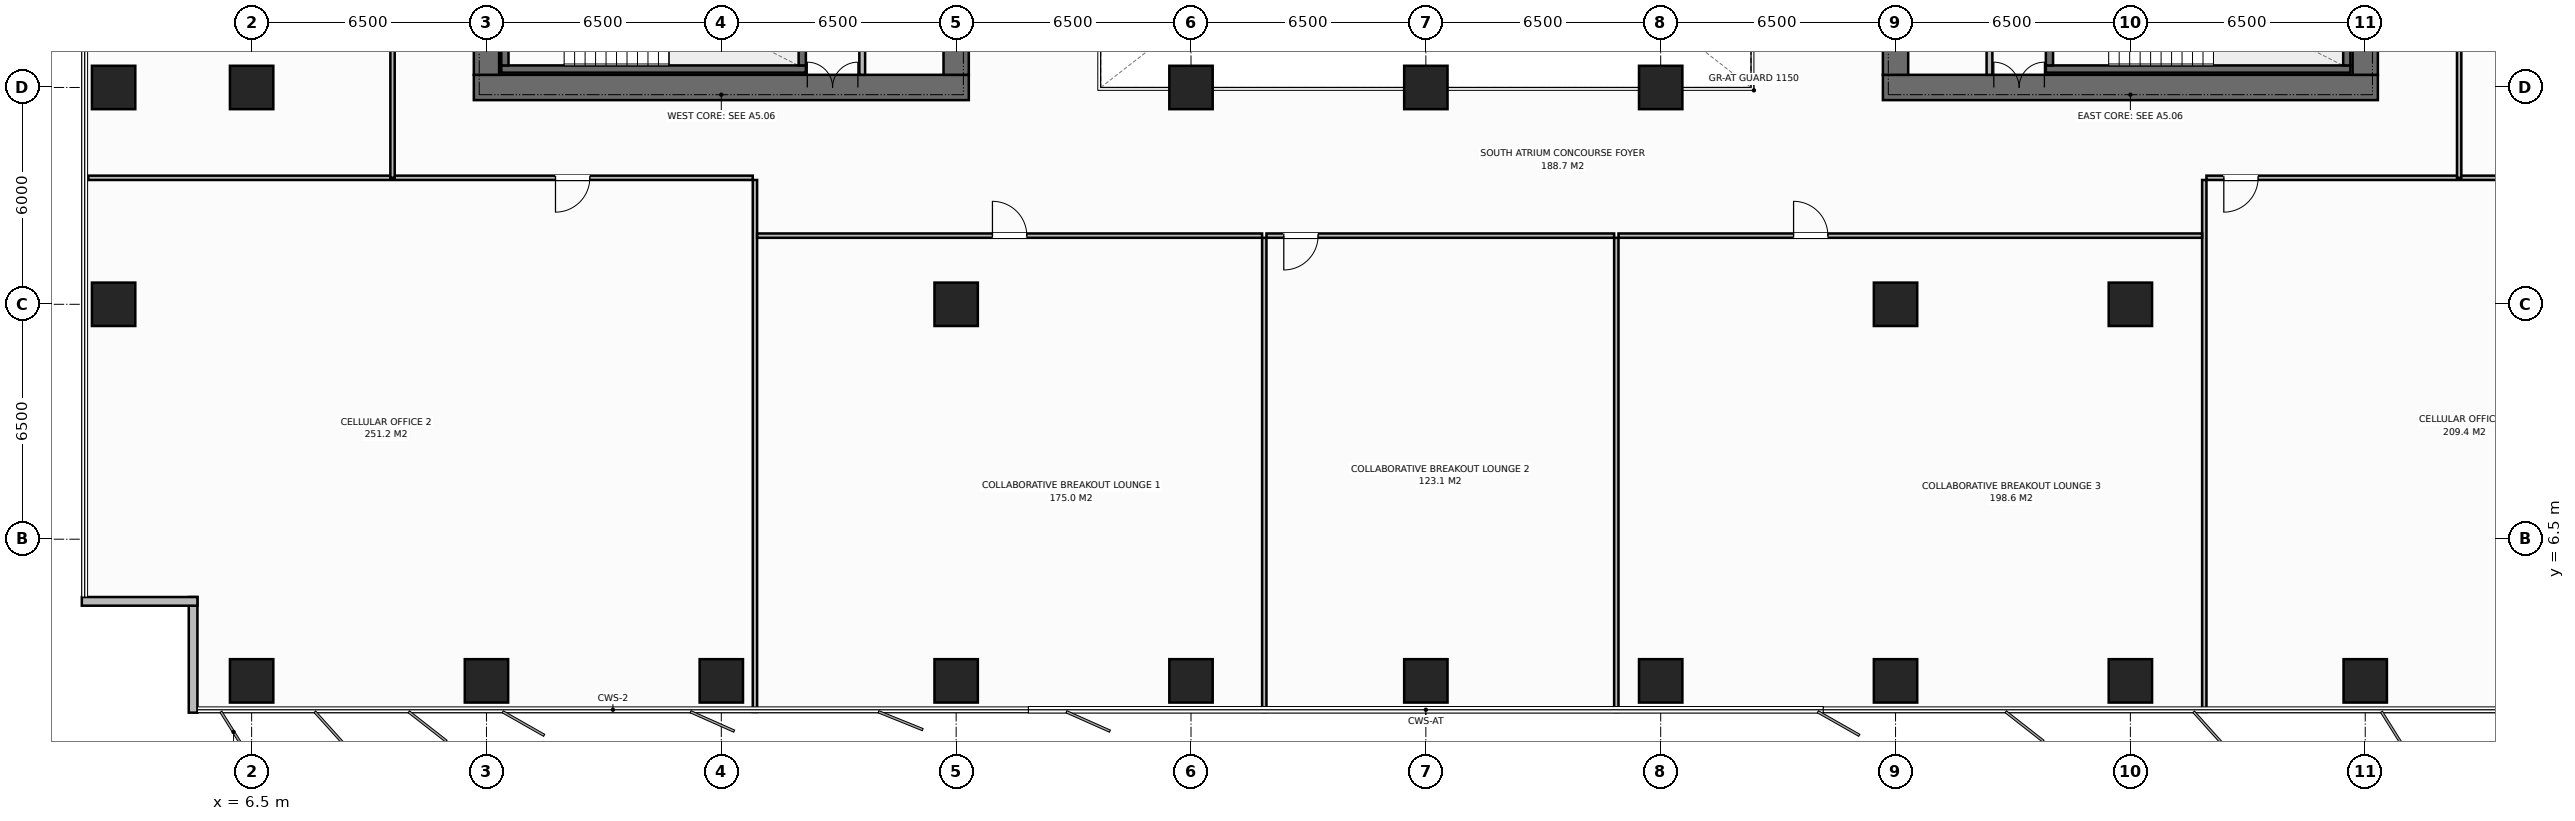
"""IFC4 building model, lengths in metres.
Left out: names, types, materials, properties, quantities, classifications, styles, units other than length and angle.
Written with IfcOpenShell. Run it as: python <this file> out.ifc"""

import sys

from ifc_helpers import new_model, si_unit, direction, frame, frame_2d, origin, origin_2d, place, context, subcontext, project, spatial, rectangle, extrude, element, fill, save


model = new_model("IFC4")
c1 = context("Model", 3, precision=1e-05, world=origin(), true_north=direction((0.0, 1.0)))
c2 = subcontext(c1, "Body", "Model", "MODEL_VIEW")
j1 = project(units=[si_unit("LENGTHUNIT", "METRE"), si_unit("PLANEANGLEUNIT", "RADIAN")], contexts=[c1])
p1 = place(None, origin())
s1 = spatial("IfcSite", under=j1, at=p1, CompositionType="ELEMENT")
p2 = place(p1, origin())
s2 = spatial("IfcBuilding", under=s1, at=p2, CompositionType="ELEMENT")
p3 = place(p2, frame((0.0, 0.0, 112.6)))
s3 = spatial("IfcBuildingStorey", under=s2, at=p3, CompositionType="ELEMENT", Elevation=112.6)
p4 = place(p3, frame((12.65, 19.0, 0.0), z_axis=(0.0, 0.0, 1.0), x_axis=(1.0, 0.0, 0.0)))
e1 = element("IfcWall", 1, at=p4, inside=s3, PredefinedType="SHEAR", context=c2, shape_type="SweptSolid", body=[
    extrude(rectangle(XDim=13.7, YDim=0.7, at=frame_2d((6.85, 0.0))), origin(), (0.0, 0.0, 1.0), 3.8),
])
p5 = place(p4, frame((9.23, 0.0, 0.0)))
e2 = element("IfcOpeningElement", 2, at=p5, cuts=e1, PredefinedType="OPENING", context=c2, shape_type="SweptSolid", body=[
    extrude(rectangle(XDim=1.4, YDim=2.2, at=frame_2d((0.7, 1.1))), frame((0.0, 0.36, 0.0), z_axis=(0.0, -1.0, 0.0), x_axis=(1.0, 0.0, 0.0)), (0.0, 0.0, 1.0), 0.72),
])
p6 = place(p3, frame((13.0, 19.35, 0.0), z_axis=(0.0, 0.0, 1.0), x_axis=(0.0, 1.0, 0.0)))
e3 = element("IfcWall", 3, at=p6, inside=s3, PredefinedType="SHEAR", context=c2, shape_type="SweptSolid", body=[
    extrude(rectangle(XDim=13.3, YDim=0.7, at=frame_2d((6.65, 0.0))), origin(), (0.0, 0.0, 1.0), 3.8),
])
p7 = place(p6, frame((4.7, 0.0, 0.0)))
e4 = element("IfcOpeningElement", 4, at=p7, cuts=e3, PredefinedType="OPENING", context=c2, shape_type="SweptSolid", body=[
    extrude(rectangle(XDim=1.4, YDim=2.2, at=frame_2d((0.7, 1.1))), frame((0.0, 0.36, 0.0), z_axis=(0.0, -1.0, 0.0), x_axis=(1.0, 0.0, 0.0)), (0.0, 0.0, 1.0), 0.72),
])
p8 = place(p3, frame((26.0, 19.35, 0.0), z_axis=(0.0, 0.0, 1.0), x_axis=(0.0, 1.0, 0.0)))
e5 = element("IfcWall", 5, at=p8, inside=s3, PredefinedType="SHEAR", context=c2, shape_type="SweptSolid", body=[
    extrude(rectangle(XDim=13.3, YDim=0.7, at=frame_2d((6.65, 0.0))), origin(), (0.0, 0.0, 1.0), 3.8),
])
p9 = place(p3, frame((51.65, 19.0, 0.0), z_axis=(0.0, 0.0, 1.0), x_axis=(1.0, 0.0, 0.0)))
e6 = element("IfcWall", 6, at=p9, inside=s3, PredefinedType="SHEAR", context=c2, shape_type="SweptSolid", body=[
    extrude(rectangle(XDim=13.7, YDim=0.7, at=frame_2d((6.85, 0.0))), origin(), (0.0, 0.0, 1.0), 3.8),
])
p10 = place(p9, frame((3.07, 0.0, 0.0)))
e7 = element("IfcOpeningElement", 7, at=p10, cuts=e6, PredefinedType="OPENING", context=c2, shape_type="SweptSolid", body=[
    extrude(rectangle(XDim=1.4, YDim=2.2, at=frame_2d((0.7, 1.1))), frame((0.0, 0.36, 0.0), z_axis=(0.0, -1.0, 0.0), x_axis=(1.0, 0.0, 0.0)), (0.0, 0.0, 1.0), 0.72),
])
p11 = place(p3, frame((52.0, 19.35, 0.0), z_axis=(0.0, 0.0, 1.0), x_axis=(0.0, 1.0, 0.0)))
e8 = element("IfcWall", 8, at=p11, inside=s3, PredefinedType="SHEAR", context=c2, shape_type="SweptSolid", body=[
    extrude(rectangle(XDim=13.3, YDim=0.7, at=frame_2d((6.65, 0.0))), origin(), (0.0, 0.0, 1.0), 3.8),
])
p12 = place(p3, frame((65.0, 19.35, 0.0), z_axis=(0.0, 0.0, 1.0), x_axis=(0.0, 1.0, 0.0)))
e9 = element("IfcWall", 9, at=p12, inside=s3, PredefinedType="SHEAR", context=c2, shape_type="SweptSolid", body=[
    extrude(rectangle(XDim=13.3, YDim=0.7, at=frame_2d((6.65, 0.0))), origin(), (0.0, 0.0, 1.0), 3.8),
])
p13 = place(p12, frame((8.1, 0.0, 0.0)))
e10 = element("IfcOpeningElement", 10, at=p13, cuts=e9, PredefinedType="OPENING", context=c2, shape_type="SweptSolid", body=[
    extrude(rectangle(XDim=1.3, YDim=2.2, at=frame_2d((0.65, 1.1))), frame((0.0, 0.36, 0.0), z_axis=(0.0, -1.0, 0.0), x_axis=(1.0, 0.0, 0.0)), (0.0, 0.0, 1.0), 0.72),
])
p14 = place(p3, frame((13.41, 19.51, 0.0), z_axis=(0.0, 0.0, 1.0), x_axis=(1.0, 0.0, 0.0)))
e11 = element("IfcWall", 11, at=p14, inside=s3, PredefinedType="SHEAR", context=c2, shape_type="SweptSolid", body=[
    extrude(rectangle(XDim=8.43, YDim=0.2, at=frame_2d((4.215, 0.0))), origin(), (0.0, 0.0, 1.0), 3.8),
])
for number, where, z_axis, x_axis in (
    (12, (13.51, 19.61, 0.0), (0.0, 0.0, 1.0), (0.0, 1.0, 0.0)),
    (13, (21.74, 19.61, 0.0), (0.0, 0.0, 1.0), (0.0, 1.0, 0.0)),
):
    element("IfcWall", number, at=place(p3, frame(where, z_axis=z_axis, x_axis=x_axis)), inside=s3, PredefinedType="SHEAR", context=c2, shape_type="SweptSolid", body=[
        extrude(rectangle(XDim=3.28, YDim=0.2, at=frame_2d((1.64, 0.0))), origin(), (0.0, 0.0, 1.0), 3.8),
    ])
p15 = place(p3, frame((56.16, 19.51, 0.0), z_axis=(0.0, 0.0, 1.0), x_axis=(1.0, 0.0, 0.0)))
e14 = element("IfcWall", 14, at=p15, inside=s3, PredefinedType="SHEAR", context=c2, shape_type="SweptSolid", body=[
    extrude(rectangle(XDim=8.43, YDim=0.2, at=frame_2d((4.215, 0.0))), origin(), (0.0, 0.0, 1.0), 3.8),
])
for number, where, z_axis, x_axis in (
    (15, (56.26, 19.61, 0.0), (0.0, 0.0, 1.0), (0.0, 1.0, 0.0)),
    (16, (64.49, 19.61, 0.0), (0.0, 0.0, 1.0), (0.0, 1.0, 0.0)),
):
    element("IfcWall", number, at=place(p3, frame(where, z_axis=z_axis, x_axis=x_axis)), inside=s3, PredefinedType="SHEAR", context=c2, shape_type="SweptSolid", body=[
        extrude(rectangle(XDim=3.28, YDim=0.2, at=frame_2d((1.64, 0.0))), origin(), (0.0, 0.0, 1.0), 3.8),
    ])
for number, where, z_axis, x_axis in (
    (17, (58.5, 13.0, 0.0), (0.0, 0.0, 1.0), (1.0, 0.0, 0.0)),
    (18, (6.5, 19.0, 0.0), (0.0, 0.0, 1.0), (1.0, 0.0, 0.0)),
    (19, (32.5, 19.0, 0.0), (0.0, 0.0, 1.0), (1.0, 0.0, 0.0)),
    (20, (39.0, 19.0, 0.0), (0.0, 0.0, 1.0), (1.0, 0.0, 0.0)),
    (21, (45.5, 19.0, 0.0), (0.0, 0.0, 1.0), (1.0, 0.0, 0.0)),
    (22, (26.0, 13.0, 0.0), (0.0, 0.0, 1.0), (1.0, 0.0, 0.0)),
    (23, (52.0, 13.0, 0.0), (0.0, 0.0, 1.0), (1.0, 0.0, 0.0)),
    (24, (6.5, 2.58, 0.0), (0.0, 0.0, 1.0), (1.0, 0.0, 0.0)),
    (25, (13.0, 2.58, 0.0), (0.0, 0.0, 1.0), (1.0, 0.0, 0.0)),
    (26, (19.5, 2.58, 0.0), (0.0, 0.0, 1.0), (1.0, 0.0, 0.0)),
    (27, (26.0, 2.58, 0.0), (0.0, 0.0, 1.0), (1.0, 0.0, 0.0)),
    (28, (32.5, 2.58, 0.0), (0.0, 0.0, 1.0), (1.0, 0.0, 0.0)),
    (29, (39.0, 2.58, 0.0), (0.0, 0.0, 1.0), (1.0, 0.0, 0.0)),
    (30, (45.5, 2.58, 0.0), (0.0, 0.0, 1.0), (1.0, 0.0, 0.0)),
    (31, (52.0, 2.58, 0.0), (0.0, 0.0, 1.0), (1.0, 0.0, 0.0)),
    (32, (58.5, 2.58, 0.0), (0.0, 0.0, 1.0), (1.0, 0.0, 0.0)),
    (33, (65.0, 2.58, 0.0), (0.0, 0.0, 1.0), (1.0, 0.0, 0.0)),
    (34, (2.68, 13.0, 0.0), (0.0, 0.0, 1.0), (1.0, 0.0, 0.0)),
    (35, (2.68, 19.0, 0.0), (0.0, 0.0, 1.0), (1.0, 0.0, 0.0)),
):
    element("IfcColumn", number, at=place(p3, frame(where, z_axis=z_axis, x_axis=x_axis)), inside=s3, PredefinedType="COLUMN", context=c2, shape_type="SweptSolid", body=[
        extrude(rectangle(XDim=1.2, YDim=1.2, at=origin_2d()), origin(), (0.0, 0.0, 1.0), 3.8),
    ])
for number, where, z_axis, x_axis in (
    (36, (4.88, 1.7, 0.0), (0.0, 0.0, 1.0), (0.0, 1.0, 0.0)),
    (37, (5.0, 4.78, 0.0), (0.0, 0.0, 1.0), (-1.0, 0.0, 0.0)),
):
    element("IfcWall", number, at=place(p3, frame(where, z_axis=z_axis, x_axis=x_axis)), inside=s3, PredefinedType="STANDARD", context=c2, shape_type="SweptSolid", body=[
        extrude(rectangle(XDim=3.2, YDim=0.24, at=frame_2d((1.6, 0.0))), origin(), (0.0, 0.0, 1.0), 3.565),
    ])
p16 = place(p3, frame((23.4, 19.35, 0.0), z_axis=(0.0, 0.0, 1.0), x_axis=(0.0, 1.0, 0.0)))
e38 = element("IfcWall", 38, at=p16, inside=s3, PredefinedType="STANDARD", context=c2, shape_type="SweptSolid", body=[
    extrude(rectangle(XDim=13.3, YDim=0.16, at=frame_2d((6.65, 0.0))), origin(), (0.0, 0.0, 1.0), 3.565),
])
p17 = place(p16, frame((1.65, 0.0, 0.0)))
e39 = element("IfcOpeningElement", 39, at=p17, cuts=e38, PredefinedType="OPENING", context=c2, shape_type="SweptSolid", body=[
    extrude(rectangle(XDim=0.95, YDim=2.15, at=frame_2d((0.475, 1.075))), frame((0.0, 0.09, 0.0), z_axis=(0.0, -1.0, 0.0), x_axis=(1.0, 0.0, 0.0)), (0.0, 0.0, 1.0), 0.18),
])
p18 = place(p16, frame((4.95, 0.0, 0.0)))
e40 = element("IfcOpeningElement", 40, at=p18, cuts=e38, PredefinedType="OPENING", context=c2, shape_type="SweptSolid", body=[
    extrude(rectangle(XDim=1.1, YDim=2.2, at=frame_2d((0.55, 1.1))), frame((0.0, 0.09, 0.0), z_axis=(0.0, -1.0, 0.0), x_axis=(1.0, 0.0, 0.0)), (0.0, 0.0, 1.0), 0.18),
])
p19 = place(p16, frame((7.1, 0.0, 0.0)))
e41 = element("IfcOpeningElement", 41, at=p19, cuts=e38, PredefinedType="OPENING", context=c2, shape_type="SweptSolid", body=[
    extrude(rectangle(XDim=1.1, YDim=2.2, at=frame_2d((0.55, 1.1))), frame((0.0, 0.09, 0.0), z_axis=(0.0, -1.0, 0.0), x_axis=(1.0, 0.0, 0.0)), (0.0, 0.0, 1.0), 0.18),
])
p20 = place(p3, frame((54.6, 19.35, 0.0), z_axis=(0.0, 0.0, 1.0), x_axis=(0.0, 1.0, 0.0)))
e42 = element("IfcWall", 42, at=p20, inside=s3, PredefinedType="STANDARD", context=c2, shape_type="SweptSolid", body=[
    extrude(rectangle(XDim=13.3, YDim=0.16, at=frame_2d((6.65, 0.0))), origin(), (0.0, 0.0, 1.0), 3.565),
])
p21 = place(p20, frame((1.65, 0.0, 0.0)))
e43 = element("IfcOpeningElement", 43, at=p21, cuts=e42, PredefinedType="OPENING", context=c2, shape_type="SweptSolid", body=[
    extrude(rectangle(XDim=0.95, YDim=2.15, at=frame_2d((0.475, 1.075))), frame((0.0, 0.09, 0.0), z_axis=(0.0, -1.0, 0.0), x_axis=(1.0, 0.0, 0.0)), (0.0, 0.0, 1.0), 0.18),
])
p22 = place(p20, frame((4.95, 0.0, 0.0)))
e44 = element("IfcOpeningElement", 44, at=p22, cuts=e42, PredefinedType="OPENING", context=c2, shape_type="SweptSolid", body=[
    extrude(rectangle(XDim=1.1, YDim=2.2, at=frame_2d((0.55, 1.1))), frame((0.0, 0.09, 0.0), z_axis=(0.0, -1.0, 0.0), x_axis=(1.0, 0.0, 0.0)), (0.0, 0.0, 1.0), 0.18),
])
p23 = place(p20, frame((7.1, 0.0, 0.0)))
e45 = element("IfcOpeningElement", 45, at=p23, cuts=e42, PredefinedType="OPENING", context=c2, shape_type="SweptSolid", body=[
    extrude(rectangle(XDim=1.1, YDim=2.2, at=frame_2d((0.55, 1.1))), frame((0.0, 0.09, 0.0), z_axis=(0.0, -1.0, 0.0), x_axis=(1.0, 0.0, 0.0)), (0.0, 0.0, 1.0), 0.18),
])
p24 = place(p3, frame((20.431, 1.72, 0.0), z_axis=(0.0, 0.0, 1.0), x_axis=(0.0, 1.0, 0.0)))
e46 = element("IfcWall", 46, at=p24, inside=s3, PredefinedType="PARTITIONING", context=c2, shape_type="SweptSolid", body=[
    extrude(rectangle(XDim=14.72, YDim=0.12, at=frame_2d((7.36, 0.0))), origin(), (0.0, 0.0, 1.0), 3.565),
])
p25 = place(p3, frame((1.98, 16.5, 0.0), z_axis=(0.0, 0.0, 1.0), x_axis=(1.0, 0.0, 0.0)))
e47 = element("IfcWall", 47, at=p25, inside=s3, PredefinedType="PARTITIONING", context=c2, shape_type="SweptSolid", body=[
    extrude(rectangle(XDim=18.391, YDim=0.12, at=frame_2d((9.195, 0.0))), origin(), (0.0, 0.0, 1.0), 3.565),
])
p26 = place(p25, frame((12.93, 0.0, 0.0)))
e48 = element("IfcOpeningElement", 48, at=p26, cuts=e47, PredefinedType="OPENING", context=c2, shape_type="SweptSolid", body=[
    extrude(rectangle(XDim=0.95, YDim=2.15, at=frame_2d((0.475, 1.075))), frame((0.0, 0.07, 0.0), z_axis=(0.0, -1.0, 0.0), x_axis=(1.0, 0.0, 0.0)), (0.0, 0.0, 1.0), 0.14),
])
p27 = place(p3, frame((34.528, 1.72, 0.0), z_axis=(0.0, 0.0, 1.0), x_axis=(0.0, 1.0, 0.0)))
e49 = element("IfcWall", 49, at=p27, inside=s3, PredefinedType="PARTITIONING", context=c2, shape_type="SweptSolid", body=[
    extrude(rectangle(XDim=13.12, YDim=0.12, at=frame_2d((6.56, 0.0))), origin(), (0.0, 0.0, 1.0), 3.565),
])
p28 = place(p3, frame((20.491, 14.9, 0.0), z_axis=(0.0, 0.0, 1.0), x_axis=(1.0, 0.0, 0.0)))
e50 = element("IfcWall", 50, at=p28, inside=s3, PredefinedType="PARTITIONING", context=c2, shape_type="SweptSolid", body=[
    extrude(rectangle(XDim=13.977, YDim=0.12, at=frame_2d((6.989, 0.0))), origin(), (0.0, 0.0, 1.0), 3.565),
])
p29 = place(p28, frame((6.514, 0.0, 0.0)))
e51 = element("IfcOpeningElement", 51, at=p29, cuts=e50, PredefinedType="OPENING", context=c2, shape_type="SweptSolid", body=[
    extrude(rectangle(XDim=0.95, YDim=2.15, at=frame_2d((0.475, 1.075))), frame((0.0, 0.07, 0.0), z_axis=(0.0, -1.0, 0.0), x_axis=(1.0, 0.0, 0.0)), (0.0, 0.0, 1.0), 0.14),
])
p30 = place(p3, frame((44.271, 1.72, 0.0), z_axis=(0.0, 0.0, 1.0), x_axis=(0.0, 1.0, 0.0)))
e52 = element("IfcWall", 52, at=p30, inside=s3, PredefinedType="PARTITIONING", context=c2, shape_type="SweptSolid", body=[
    extrude(rectangle(XDim=13.12, YDim=0.12, at=frame_2d((6.56, 0.0))), origin(), (0.0, 0.0, 1.0), 3.565),
])
p31 = place(p3, frame((34.588, 14.9, 0.0), z_axis=(0.0, 0.0, 1.0), x_axis=(1.0, 0.0, 0.0)))
e53 = element("IfcWall", 53, at=p31, inside=s3, PredefinedType="PARTITIONING", context=c2, shape_type="SweptSolid", body=[
    extrude(rectangle(XDim=9.624, YDim=0.12, at=frame_2d((4.812, 0.0))), origin(), (0.0, 0.0, 1.0), 3.565),
])
p32 = place(p31, frame((0.48, 0.0, 0.0)))
e54 = element("IfcOpeningElement", 54, at=p32, cuts=e53, PredefinedType="OPENING", context=c2, shape_type="SweptSolid", body=[
    extrude(rectangle(XDim=0.95, YDim=2.15, at=frame_2d((0.475, 1.075))), frame((0.0, 0.07, 0.0), z_axis=(0.0, -1.0, 0.0), x_axis=(1.0, 0.0, 0.0)), (0.0, 0.0, 1.0), 0.14),
])
p33 = place(p3, frame((60.546, 1.72, 0.0), z_axis=(0.0, 0.0, 1.0), x_axis=(0.0, 1.0, 0.0)))
e55 = element("IfcWall", 55, at=p33, inside=s3, PredefinedType="PARTITIONING", context=c2, shape_type="SweptSolid", body=[
    extrude(rectangle(XDim=14.72, YDim=0.12, at=frame_2d((7.36, 0.0))), origin(), (0.0, 0.0, 1.0), 3.565),
])
p34 = place(p3, frame((44.332, 14.9, 0.0), z_axis=(0.0, 0.0, 1.0), x_axis=(1.0, 0.0, 0.0)))
e56 = element("IfcWall", 56, at=p34, inside=s3, PredefinedType="PARTITIONING", context=c2, shape_type="SweptSolid", body=[
    extrude(rectangle(XDim=16.154, YDim=0.12, at=frame_2d((8.077, 0.0))), origin(), (0.0, 0.0, 1.0), 3.565),
])
p35 = place(p34, frame((4.846, 0.0, 0.0)))
e57 = element("IfcOpeningElement", 57, at=p35, cuts=e56, PredefinedType="OPENING", context=c2, shape_type="SweptSolid", body=[
    extrude(rectangle(XDim=0.95, YDim=2.15, at=frame_2d((0.475, 1.075))), frame((0.0, 0.07, 0.0), z_axis=(0.0, -1.0, 0.0), x_axis=(1.0, 0.0, 0.0)), (0.0, 0.0, 1.0), 0.14),
])
p36 = place(p3, frame((60.606, 16.5, 0.0), z_axis=(0.0, 0.0, 1.0), x_axis=(1.0, 0.0, 0.0)))
e58 = element("IfcWall", 58, at=p36, inside=s3, PredefinedType="PARTITIONING", context=c2, shape_type="SweptSolid", body=[
    extrude(rectangle(XDim=15.414, YDim=0.12, at=frame_2d((7.707, 0.0))), origin(), (0.0, 0.0, 1.0), 3.565),
])
p37 = place(p36, frame((0.48, 0.0, 0.0)))
e59 = element("IfcOpeningElement", 59, at=p37, cuts=e58, PredefinedType="OPENING", context=c2, shape_type="SweptSolid", body=[
    extrude(rectangle(XDim=0.95, YDim=2.15, at=frame_2d((0.475, 1.075))), frame((0.0, 0.07, 0.0), z_axis=(0.0, -1.0, 0.0), x_axis=(1.0, 0.0, 0.0)), (0.0, 0.0, 1.0), 0.14),
])
p38 = place(p3, frame((10.4, 16.5, 0.0), z_axis=(0.0, 0.0, 1.0), x_axis=(0.0, 1.0, 0.0)))
e60 = element("IfcWall", 60, at=p38, inside=s3, PredefinedType="PARTITIONING", context=c2, shape_type="SweptSolid", body=[
    extrude(rectangle(XDim=9.5, YDim=0.12, at=frame_2d((4.75, 0.0))), origin(), (0.0, 0.0, 1.0), 3.565),
])
p39 = place(p38, frame((5.325, 0.0, 0.0)))
e61 = element("IfcOpeningElement", 61, at=p39, cuts=e60, PredefinedType="OPENING", context=c2, shape_type="SweptSolid", body=[
    extrude(rectangle(XDim=0.95, YDim=2.15, at=frame_2d((0.475, 1.075))), frame((0.0, 0.07, 0.0), z_axis=(0.0, -1.0, 0.0), x_axis=(1.0, 0.0, 0.0)), (0.0, 0.0, 1.0), 0.14),
])
p40 = place(p3, frame((67.6, 16.5, 0.0), z_axis=(0.0, 0.0, 1.0), x_axis=(0.0, 1.0, 0.0)))
e62 = element("IfcWall", 62, at=p40, inside=s3, PredefinedType="PARTITIONING", context=c2, shape_type="SweptSolid", body=[
    extrude(rectangle(XDim=16.9, YDim=0.12, at=frame_2d((8.45, 0.0))), origin(), (0.0, 0.0, 1.0), 3.565),
])
p41 = place(p40, frame((9.025, 0.0, 0.0)))
e63 = element("IfcOpeningElement", 63, at=p41, cuts=e62, PredefinedType="OPENING", context=c2, shape_type="SweptSolid", body=[
    extrude(rectangle(XDim=0.95, YDim=2.15, at=frame_2d((0.475, 1.075))), frame((0.0, 0.07, 0.0), z_axis=(0.0, -1.0, 0.0), x_axis=(1.0, 0.0, 0.0)), (0.0, 0.0, 1.0), 0.14),
])
p42 = place(p5, origin())
e64 = element("IfcDoor", 64, at=p42, inside=s3, OperationType="DOUBLE_DOOR_SINGLE_SWING", PredefinedType="DOOR", context=c2, shape_type="SweptSolid", body=[
    extrude(rectangle(XDim=1.4, YDim=2.2, at=frame_2d((0.7, 1.1))), frame((0.0, 0.125, 0.0), z_axis=(0.0, -1.0, 0.0), x_axis=(1.0, 0.0, 0.0)), (0.0, 0.0, 1.0), 0.05),
])
fill(e2, e64)
p43 = place(p10, origin())
e65 = element("IfcDoor", 65, at=p43, inside=s3, OperationType="DOUBLE_DOOR_SINGLE_SWING", PredefinedType="DOOR", context=c2, shape_type="SweptSolid", body=[
    extrude(rectangle(XDim=1.4, YDim=2.2, at=frame_2d((0.7, 1.1))), frame((0.0, 0.125, 0.0), z_axis=(0.0, -1.0, 0.0), x_axis=(1.0, 0.0, 0.0)), (0.0, 0.0, 1.0), 0.05),
])
fill(e7, e65)
p44 = place(p26, origin())
e66 = element("IfcDoor", 66, at=p44, inside=s3, OperationType="SINGLE_SWING_RIGHT", PredefinedType="DOOR", context=c2, shape_type="SweptSolid", body=[
    extrude(rectangle(XDim=0.95, YDim=2.15, at=frame_2d((0.475, 1.075))), frame((0.0, 0.025, 0.0), z_axis=(0.0, -1.0, 0.0), x_axis=(1.0, 0.0, 0.0)), (0.0, 0.0, 1.0), 0.05),
])
fill(e48, e66)
p45 = place(p29, origin())
e67 = element("IfcDoor", 67, at=p45, inside=s3, OperationType="SINGLE_SWING_LEFT", PredefinedType="DOOR", context=c2, shape_type="SweptSolid", body=[
    extrude(rectangle(XDim=0.95, YDim=2.15, at=frame_2d((0.475, 1.075))), frame((0.0, 0.025, 0.0), z_axis=(0.0, -1.0, 0.0), x_axis=(1.0, 0.0, 0.0)), (0.0, 0.0, 1.0), 0.05),
])
fill(e51, e67)
p46 = place(p32, origin())
e68 = element("IfcDoor", 68, at=p46, inside=s3, OperationType="SINGLE_SWING_RIGHT", PredefinedType="DOOR", context=c2, shape_type="SweptSolid", body=[
    extrude(rectangle(XDim=0.95, YDim=2.15, at=frame_2d((0.475, 1.075))), frame((0.0, 0.025, 0.0), z_axis=(0.0, -1.0, 0.0), x_axis=(1.0, 0.0, 0.0)), (0.0, 0.0, 1.0), 0.05),
])
fill(e54, e68)
p47 = place(p35, origin())
e69 = element("IfcDoor", 69, at=p47, inside=s3, OperationType="SINGLE_SWING_LEFT", PredefinedType="DOOR", context=c2, shape_type="SweptSolid", body=[
    extrude(rectangle(XDim=0.95, YDim=2.15, at=frame_2d((0.475, 1.075))), frame((0.0, 0.025, 0.0), z_axis=(0.0, -1.0, 0.0), x_axis=(1.0, 0.0, 0.0)), (0.0, 0.0, 1.0), 0.05),
])
fill(e57, e69)
p48 = place(p37, origin())
e70 = element("IfcDoor", 70, at=p48, inside=s3, OperationType="SINGLE_SWING_RIGHT", PredefinedType="DOOR", context=c2, shape_type="SweptSolid", body=[
    extrude(rectangle(XDim=0.95, YDim=2.15, at=frame_2d((0.475, 1.075))), frame((0.0, 0.025, 0.0), z_axis=(0.0, -1.0, 0.0), x_axis=(1.0, 0.0, 0.0)), (0.0, 0.0, 1.0), 0.05),
])
fill(e59, e70)
save(model, sys.argv[1])
